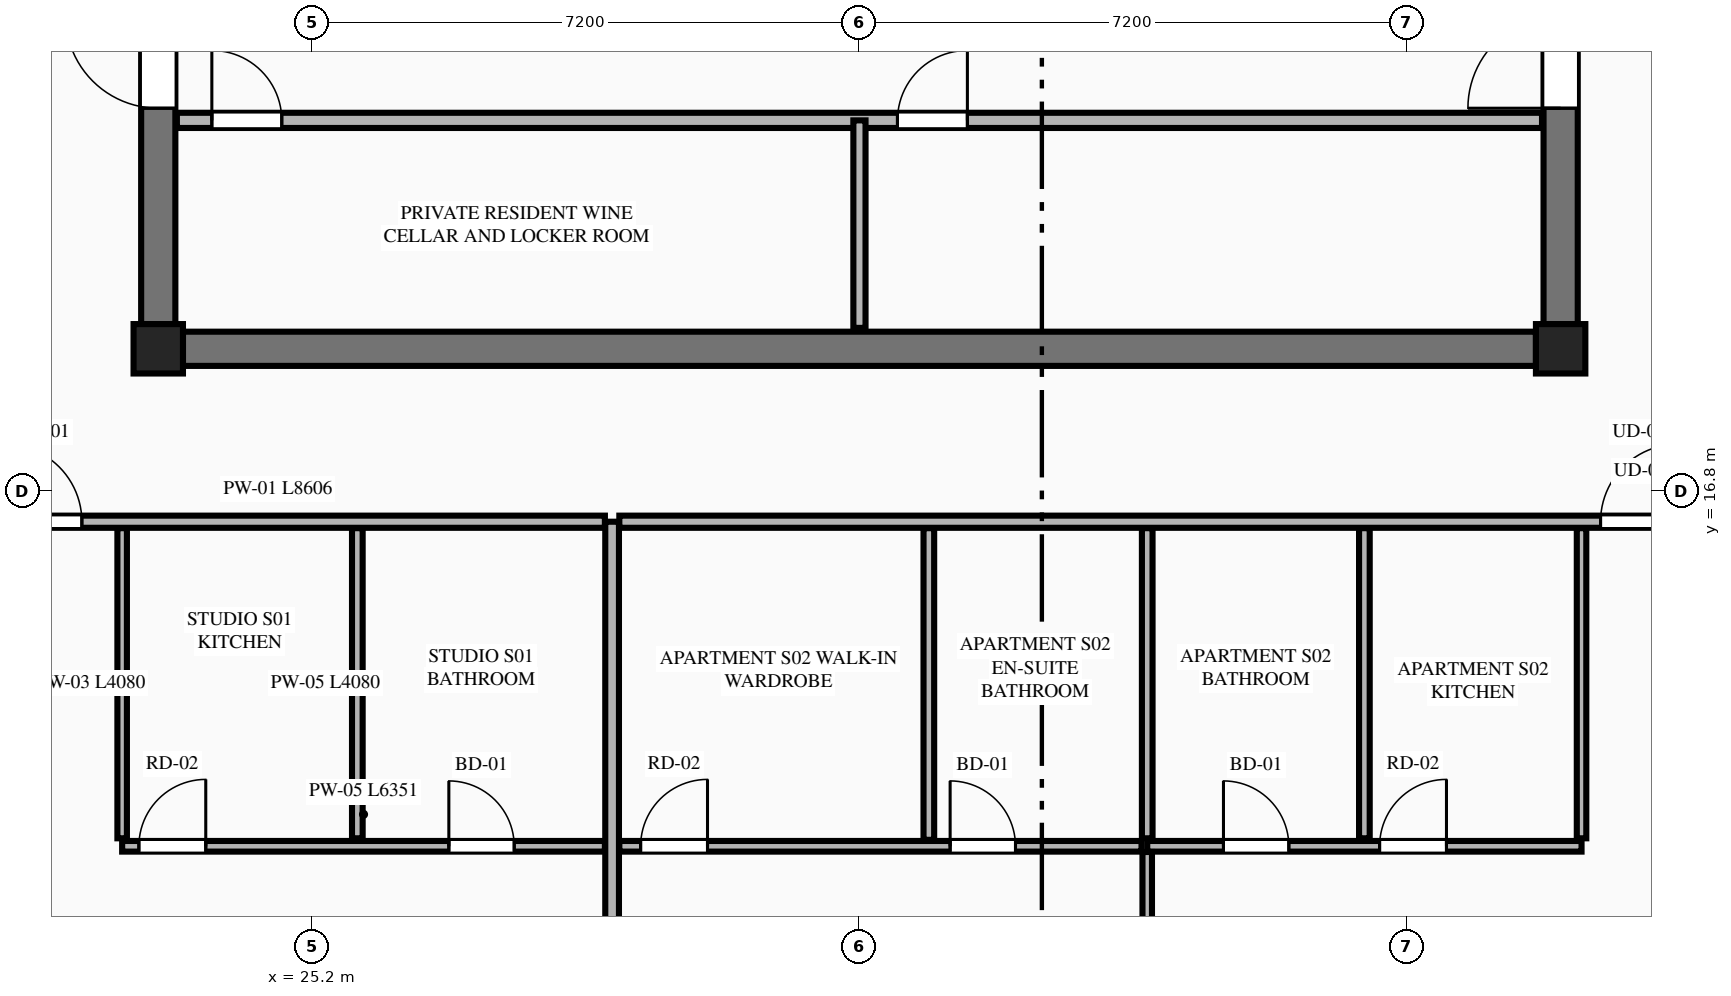
"""IFC4 building model, lengths in metres.
Left out: names, types, materials, properties, quantities, classifications, styles, units other than length and angle.
Written with IfcOpenShell. Run it as: python <this file> out.ifc"""

import sys

from ifc_helpers import new_model, si_unit, direction, frame, frame_2d, origin, origin_2d, place, context, subcontext, project, spatial, rectangle, extrude, element, fill, save


model = new_model("IFC4")
c1 = context("Model", 3, precision=1e-05, world=origin(), true_north=direction((0.0, 1.0)))
c2 = subcontext(c1, "Body", "Model", "MODEL_VIEW")
j1 = project(units=[si_unit("LENGTHUNIT", "METRE"), si_unit("PLANEANGLEUNIT", "RADIAN")], contexts=[c1])
p1 = place(None, origin())
s1 = spatial("IfcSite", under=j1, at=p1, CompositionType="ELEMENT")
p2 = place(p1, origin())
s2 = spatial("IfcBuilding", under=s1, at=p2, CompositionType="ELEMENT")
p3 = place(p2, frame((0.0, 0.0, 234.3)))
s3 = spatial("IfcBuildingStorey", under=s2, at=p3, CompositionType="ELEMENT", Elevation=234.3)
for number, where, z_axis, x_axis in (
    (1, (23.175, 18.675, 0.0), (0.0, 0.0, 1.0), (1.0, 0.0, 0.0)),
    (2, (41.625, 18.675, 0.0), (0.0, 0.0, 1.0), (1.0, 0.0, 0.0)),
):
    element("IfcColumn", number, at=place(p3, frame(where, z_axis=z_axis, x_axis=x_axis)), inside=s3, PredefinedType="COLUMN", context=c2, shape_type="SweptSolid", body=[
        extrude(rectangle(XDim=0.65, YDim=0.65, at=origin_2d()), origin(), (0.0, 0.0, 1.0), 3.65),
    ])
p4 = place(p3, frame((23.5, 18.675, 0.0), z_axis=(0.0, 0.0, 1.0), x_axis=(1.0, 0.0, 0.0)))
e3 = element("IfcWall", 3, at=p4, inside=s3, PredefinedType="SHEAR", context=c2, shape_type="SweptSolid", body=[
    extrude(rectangle(XDim=17.8, YDim=0.45, at=frame_2d((8.9, 0.0))), origin(), (0.0, 0.0, 1.0), 3.45),
])
p5 = place(p3, frame((23.175, 19.0, 0.0), z_axis=(0.0, 0.0, 1.0), x_axis=(0.0, 1.0, 0.0)))
e4 = element("IfcWall", 4, at=p5, inside=s3, PredefinedType="SHEAR", context=c2, shape_type="SweptSolid", body=[
    extrude(rectangle(XDim=13.8, YDim=0.45, at=frame_2d((6.9, 0.0))), origin(), (0.0, 0.0, 1.0), 3.45),
])
p6 = place(p5, frame((2.84, 0.0, 0.0)))
e5 = element("IfcOpeningElement", 5, at=p6, cuts=e4, PredefinedType="OPENING", context=c2, shape_type="SweptSolid", body=[
    extrude(rectangle(XDim=1.22, YDim=2.25, at=frame_2d((0.61, 1.125))), frame((0.0, 0.235, 0.0), z_axis=(0.0, -1.0, 0.0), x_axis=(1.0, 0.0, 0.0)), (0.0, 0.0, 1.0), 0.47),
])
p7 = place(p3, frame((41.625, 19.0, 0.0), z_axis=(0.0, 0.0, 1.0), x_axis=(0.0, 1.0, 0.0)))
e6 = element("IfcWall", 6, at=p7, inside=s3, PredefinedType="SHEAR", context=c2, shape_type="SweptSolid", body=[
    extrude(rectangle(XDim=13.8, YDim=0.45, at=frame_2d((6.9, 0.0))), origin(), (0.0, 0.0, 1.0), 3.45),
])
p8 = place(p7, frame((2.84, 0.0, 0.0)))
e7 = element("IfcOpeningElement", 7, at=p8, cuts=e6, PredefinedType="OPENING", context=c2, shape_type="SweptSolid", body=[
    extrude(rectangle(XDim=1.22, YDim=2.25, at=frame_2d((0.61, 1.125))), frame((0.0, 0.235, 0.0), z_axis=(0.0, -1.0, 0.0), x_axis=(1.0, 0.0, 0.0)), (0.0, 0.0, 1.0), 0.47),
])
p9 = place(p3, frame((23.42, 21.68, 0.0), z_axis=(0.0, 0.0, 1.0), x_axis=(1.0, 0.0, 0.0)))
e8 = element("IfcWall", 8, at=p9, inside=s3, PredefinedType="PLUMBINGWALL", context=c2, shape_type="SweptSolid", body=[
    extrude(rectangle(XDim=17.96, YDim=0.2, at=frame_2d((8.98, 0.0))), origin(), (0.0, 0.0, 1.0), 3.45),
])
p10 = place(p9, frame((0.46, 0.0, 0.0)))
e9 = element("IfcOpeningElement", 9, at=p10, cuts=e8, PredefinedType="OPENING", context=c2, shape_type="SweptSolid", body=[
    extrude(rectangle(XDim=0.92, YDim=2.15, at=frame_2d((0.46, 1.075))), frame((0.0, 0.11, 0.0), z_axis=(0.0, -1.0, 0.0), x_axis=(1.0, 0.0, 0.0)), (0.0, 0.0, 1.0), 0.22),
])
p11 = place(p9, frame((9.48, 0.0, 0.0)))
e10 = element("IfcOpeningElement", 10, at=p11, cuts=e8, PredefinedType="OPENING", context=c2, shape_type="SweptSolid", body=[
    extrude(rectangle(XDim=0.92, YDim=2.15, at=frame_2d((0.46, 1.075))), frame((0.0, 0.11, 0.0), z_axis=(0.0, -1.0, 0.0), x_axis=(1.0, 0.0, 0.0)), (0.0, 0.0, 1.0), 0.22),
])
p12 = place(p3, frame((32.4, 18.95, 0.0), z_axis=(0.0, 0.0, 1.0), x_axis=(0.0, 1.0, 0.0)))
e11 = element("IfcWall", 11, at=p12, inside=s3, PredefinedType="PARTITIONING", context=c2, shape_type="SweptSolid", body=[
    extrude(rectangle(XDim=2.73, YDim=0.16, at=frame_2d((1.365, 0.0))), origin(), (0.0, 0.0, 1.0), 3.45),
])
p13 = place(p3, frame((29.146, 7.405, 0.0), z_axis=(0.0, 0.0, 1.0), x_axis=(0.0, 1.0, 0.0)))
e12 = element("IfcWall", 12, at=p13, inside=s3, PredefinedType="PARTITIONING", context=c2, shape_type="SweptSolid", body=[
    extrude(rectangle(XDim=8.995, YDim=0.18, at=frame_2d((4.498, 0.0))), origin(), (0.0, 0.0, 1.0), 2.907),
])
p14 = place(p3, frame((20.445, 16.4, 0.0), z_axis=(0.0, 0.0, 1.0), x_axis=(1.0, 0.0, 0.0)))
e13 = element("IfcWall", 13, at=p14, inside=s3, PredefinedType="PARTITIONING", context=c2, shape_type="SweptSolid", body=[
    extrude(rectangle(XDim=8.606, YDim=0.16, at=frame_2d((4.303, 0.0))), origin(), (0.0, 0.0, 1.0), 3.45),
])
p15 = place(p14, frame((0.705, 0.0, 0.0)))
e14 = element("IfcOpeningElement", 14, at=p15, cuts=e13, PredefinedType="OPENING", context=c2, shape_type="SweptSolid", body=[
    extrude(rectangle(XDim=1.02, YDim=2.25, at=frame_2d((0.51, 1.125))), frame((0.0, 0.09, 0.0), z_axis=(0.0, -1.0, 0.0), x_axis=(1.0, 0.0, 0.0)), (0.0, 0.0, 1.0), 0.18),
])
p16 = place(p3, frame((22.7, 12.235, 0.0), z_axis=(0.0, 0.0, 1.0), x_axis=(0.0, 1.0, 0.0)))
e15 = element("IfcWall", 15, at=p16, inside=s3, PredefinedType="PARTITIONING", context=c2, shape_type="SweptSolid", body=[
    extrude(rectangle(XDim=4.08, YDim=0.125, at=frame_2d((2.04, 0.0))), origin(), (0.0, 0.0, 1.0), 2.907),
])
p17 = place(p3, frame((22.7, 12.13, 0.0), z_axis=(0.0, 0.0, 1.0), x_axis=(1.0, 0.0, 0.0)))
e16 = element("IfcWall", 16, at=p17, inside=s3, PredefinedType="PLUMBINGWALL", context=c2, shape_type="SweptSolid", body=[
    extrude(rectangle(XDim=6.351, YDim=0.14, at=frame_2d((3.176, 0.0))), origin(), (0.0, 0.0, 1.0), 3.45),
])
p18 = place(p17, frame((4.298, 0.0, 0.0)))
e17 = element("IfcOpeningElement", 17, at=p18, cuts=e16, PredefinedType="OPENING", context=c2, shape_type="SweptSolid", body=[
    extrude(rectangle(XDim=0.86, YDim=2.1, at=frame_2d((0.43, 1.05))), frame((0.0, 0.08, 0.0), z_axis=(0.0, -1.0, 0.0), x_axis=(1.0, 0.0, 0.0)), (0.0, 0.0, 1.0), 0.16),
])
p19 = place(p17, frame((0.22, 0.0, 0.0)))
e18 = element("IfcOpeningElement", 18, at=p19, cuts=e16, PredefinedType="OPENING", context=c2, shape_type="SweptSolid", body=[
    extrude(rectangle(XDim=0.88, YDim=2.15, at=frame_2d((0.44, 1.075))), frame((0.0, 0.08, 0.0), z_axis=(0.0, -1.0, 0.0), x_axis=(1.0, 0.0, 0.0)), (0.0, 0.0, 1.0), 0.16),
])
p20 = place(p3, frame((25.794, 12.235, 0.0), z_axis=(0.0, 0.0, 1.0), x_axis=(0.0, 1.0, 0.0)))
e19 = element("IfcWall", 19, at=p20, inside=s3, PredefinedType="PLUMBINGWALL", context=c2, shape_type="SweptSolid", body=[
    extrude(rectangle(XDim=4.08, YDim=0.14, at=frame_2d((2.04, 0.0))), origin(), (0.0, 0.0, 1.0), 3.45),
])
p21 = place(p3, frame((29.241, 16.4, 0.0), z_axis=(0.0, 0.0, 1.0), x_axis=(1.0, 0.0, 0.0)))
e20 = element("IfcWall", 20, at=p21, inside=s3, PredefinedType="PARTITIONING", context=c2, shape_type="SweptSolid", body=[
    extrude(rectangle(XDim=15.114, YDim=0.16, at=frame_2d((7.557, 0.0))), origin(), (0.0, 0.0, 1.0), 3.45),
])
p22 = place(p21, frame((12.909, 0.0, 0.0)))
e21 = element("IfcOpeningElement", 21, at=p22, cuts=e20, PredefinedType="OPENING", context=c2, shape_type="SweptSolid", body=[
    extrude(rectangle(XDim=1.02, YDim=2.25, at=frame_2d((0.51, 1.125))), frame((0.0, 0.09, 0.0), z_axis=(0.0, -1.0, 0.0), x_axis=(1.0, 0.0, 0.0)), (0.0, 0.0, 1.0), 0.18),
])
p23 = place(p3, frame((41.9, 12.235, 0.0), z_axis=(0.0, 0.0, 1.0), x_axis=(0.0, 1.0, 0.0)))
e22 = element("IfcWall", 22, at=p23, inside=s3, PredefinedType="PARTITIONING", context=c2, shape_type="SweptSolid", body=[
    extrude(rectangle(XDim=4.08, YDim=0.125, at=frame_2d((2.04, 0.0))), origin(), (0.0, 0.0, 1.0), 2.907),
])
p24 = place(p3, frame((36.186, 12.13, 0.0), z_axis=(0.0, 0.0, 1.0), x_axis=(1.0, 0.0, 0.0)))
e23 = element("IfcWall", 23, at=p24, inside=s3, PredefinedType="PLUMBINGWALL", context=c2, shape_type="SweptSolid", body=[
    extrude(rectangle(XDim=5.714, YDim=0.14, at=frame_2d((2.857, 0.0))), origin(), (0.0, 0.0, 1.0), 3.45),
])
p25 = place(p24, frame((1.003, 0.0, 0.0)))
e24 = element("IfcOpeningElement", 24, at=p25, cuts=e23, PredefinedType="OPENING", context=c2, shape_type="SweptSolid", body=[
    extrude(rectangle(XDim=0.86, YDim=2.1, at=frame_2d((0.43, 1.05))), frame((0.0, 0.08, 0.0), z_axis=(0.0, -1.0, 0.0), x_axis=(1.0, 0.0, 0.0)), (0.0, 0.0, 1.0), 0.16),
])
p26 = place(p24, frame((3.057, 0.0, 0.0)))
e25 = element("IfcOpeningElement", 25, at=p26, cuts=e23, PredefinedType="OPENING", context=c2, shape_type="SweptSolid", body=[
    extrude(rectangle(XDim=0.88, YDim=2.15, at=frame_2d((0.44, 1.075))), frame((0.0, 0.08, 0.0), z_axis=(0.0, -1.0, 0.0), x_axis=(1.0, 0.0, 0.0)), (0.0, 0.0, 1.0), 0.16),
])
p27 = place(p3, frame((29.241, 12.13, 0.0), z_axis=(0.0, 0.0, 1.0), x_axis=(1.0, 0.0, 0.0)))
e26 = element("IfcWall", 26, at=p27, inside=s3, PredefinedType="PLUMBINGWALL", context=c2, shape_type="SweptSolid", body=[
    extrude(rectangle(XDim=6.87, YDim=0.14, at=frame_2d((3.435, 0.0))), origin(), (0.0, 0.0, 1.0), 3.45),
])
p28 = place(p27, frame((0.28, 0.0, 0.0)))
e27 = element("IfcOpeningElement", 27, at=p28, cuts=e26, PredefinedType="OPENING", context=c2, shape_type="SweptSolid", body=[
    extrude(rectangle(XDim=0.88, YDim=2.15, at=frame_2d((0.44, 1.075))), frame((0.0, 0.08, 0.0), z_axis=(0.0, -1.0, 0.0), x_axis=(1.0, 0.0, 0.0)), (0.0, 0.0, 1.0), 0.16),
])
p29 = place(p27, frame((4.352, 0.0, 0.0)))
e28 = element("IfcOpeningElement", 28, at=p29, cuts=e26, PredefinedType="OPENING", context=c2, shape_type="SweptSolid", body=[
    extrude(rectangle(XDim=0.86, YDim=2.1, at=frame_2d((0.43, 1.05))), frame((0.0, 0.08, 0.0), z_axis=(0.0, -1.0, 0.0), x_axis=(1.0, 0.0, 0.0)), (0.0, 0.0, 1.0), 0.16),
])
for number, where, z_axis, x_axis in (
    (29, (39.043, 12.235, 0.0), (0.0, 0.0, 1.0), (0.0, 1.0, 0.0)),
    (30, (36.186, 12.235, 0.0), (0.0, 0.0, 1.0), (0.0, 1.0, 0.0)),
):
    element("IfcWall", number, at=place(p3, frame(where, z_axis=z_axis, x_axis=x_axis)), inside=s3, PredefinedType="PLUMBINGWALL", context=c2, shape_type="SweptSolid", body=[
        extrude(rectangle(XDim=4.08, YDim=0.14, at=frame_2d((2.04, 0.0))), origin(), (0.0, 0.0, 1.0), 3.45),
    ])
p30 = place(p3, frame((36.186, 7.315, 0.0), z_axis=(0.0, 0.0, 1.0), x_axis=(0.0, 1.0, 0.0)))
e31 = element("IfcWall", 31, at=p30, inside=s3, PredefinedType="PARTITIONING", context=c2, shape_type="SweptSolid", body=[
    extrude(rectangle(XDim=4.74, YDim=0.125, at=frame_2d((2.37, 0.0))), origin(), (0.0, 0.0, 1.0), 3.45),
])
p31 = place(p30, frame((1.05, 0.0, 0.0)))
e32 = element("IfcOpeningElement", 32, at=p31, cuts=e31, PredefinedType="OPENING", context=c2, shape_type="SweptSolid", body=[
    extrude(rectangle(XDim=0.92, YDim=2.15, at=frame_2d((0.46, 1.075))), frame((0.0, 0.073, 0.0), z_axis=(0.0, -1.0, 0.0), x_axis=(1.0, 0.0, 0.0)), (0.0, 0.0, 1.0), 0.145),
])
p32 = place(p3, frame((33.313, 12.215, 0.0), z_axis=(0.0, 0.0, 1.0), x_axis=(0.0, 1.0, 0.0)))
e33 = element("IfcWall", 33, at=p32, inside=s3, PredefinedType="PLUMBINGWALL", context=c2, shape_type="SweptSolid", body=[
    extrude(rectangle(XDim=4.1, YDim=0.14, at=frame_2d((2.05, 0.0))), origin(), (0.0, 0.0, 1.0), 3.45),
])
p33 = place(p6, origin())
e34 = element("IfcDoor", 34, at=p33, inside=s3, OperationType="SINGLE_SWING_RIGHT", PredefinedType="DOOR", context=c2, shape_type="SweptSolid", body=[
    extrude(rectangle(XDim=1.22, YDim=2.25, at=frame_2d((0.61, 1.125))), frame((0.0, 0.025, 0.0), z_axis=(0.0, -1.0, 0.0), x_axis=(1.0, 0.0, 0.0)), (0.0, 0.0, 1.0), 0.05),
])
fill(e5, e34)
p34 = place(p8, origin())
e35 = element("IfcDoor", 35, at=p34, inside=s3, OperationType="SINGLE_SWING_LEFT", PredefinedType="DOOR", context=c2, shape_type="SweptSolid", body=[
    extrude(rectangle(XDim=1.22, YDim=2.25, at=frame_2d((0.61, 1.125))), frame((0.0, 0.025, 0.0), z_axis=(0.0, -1.0, 0.0), x_axis=(1.0, 0.0, 0.0)), (0.0, 0.0, 1.0), 0.05),
])
fill(e7, e35)
p35 = place(p10, origin())
e36 = element("IfcDoor", 36, at=p35, inside=s3, OperationType="SINGLE_SWING_LEFT", PredefinedType="DOOR", context=c2, shape_type="SweptSolid", body=[
    extrude(rectangle(XDim=0.92, YDim=2.15, at=frame_2d((0.46, 1.075))), frame((0.0, 0.025, 0.0), z_axis=(0.0, -1.0, 0.0), x_axis=(1.0, 0.0, 0.0)), (0.0, 0.0, 1.0), 0.05),
])
fill(e9, e36)
p36 = place(p11, origin())
e37 = element("IfcDoor", 37, at=p36, inside=s3, OperationType="SINGLE_SWING_RIGHT", PredefinedType="DOOR", context=c2, shape_type="SweptSolid", body=[
    extrude(rectangle(XDim=0.92, YDim=2.15, at=frame_2d((0.46, 1.075))), frame((0.0, 0.025, 0.0), z_axis=(0.0, -1.0, 0.0), x_axis=(1.0, 0.0, 0.0)), (0.0, 0.0, 1.0), 0.05),
])
fill(e10, e37)
p37 = place(p18, origin())
e38 = element("IfcDoor", 38, at=p37, inside=s3, OperationType="SINGLE_SWING_LEFT", PredefinedType="DOOR", context=c2, shape_type="SweptSolid", body=[
    extrude(rectangle(XDim=0.86, YDim=2.1, at=frame_2d((0.43, 1.05))), frame((0.0, 0.025, 0.0), z_axis=(0.0, -1.0, 0.0), x_axis=(1.0, 0.0, 0.0)), (0.0, 0.0, 1.0), 0.05),
])
fill(e17, e38)
p38 = place(p15, origin())
e39 = element("IfcDoor", 39, at=p38, inside=s3, OperationType="SINGLE_SWING_LEFT", PredefinedType="DOOR", context=c2, shape_type="SweptSolid", body=[
    extrude(rectangle(XDim=1.02, YDim=2.25, at=frame_2d((0.51, 1.125))), frame((0.0, 0.025, 0.0), z_axis=(0.0, -1.0, 0.0), x_axis=(1.0, 0.0, 0.0)), (0.0, 0.0, 1.0), 0.05),
])
fill(e14, e39)
p39 = place(p19, origin())
e40 = element("IfcDoor", 40, at=p39, inside=s3, OperationType="SINGLE_SWING_RIGHT", PredefinedType="DOOR", context=c2, shape_type="SweptSolid", body=[
    extrude(rectangle(XDim=0.88, YDim=2.15, at=frame_2d((0.44, 1.075))), frame((0.0, 0.025, 0.0), z_axis=(0.0, -1.0, 0.0), x_axis=(1.0, 0.0, 0.0)), (0.0, 0.0, 1.0), 0.05),
])
fill(e18, e40)
p40 = place(p25, origin())
e41 = element("IfcDoor", 41, at=p40, inside=s3, OperationType="SINGLE_SWING_LEFT", PredefinedType="DOOR", context=c2, shape_type="SweptSolid", body=[
    extrude(rectangle(XDim=0.86, YDim=2.1, at=frame_2d((0.43, 1.05))), frame((0.0, 0.025, 0.0), z_axis=(0.0, -1.0, 0.0), x_axis=(1.0, 0.0, 0.0)), (0.0, 0.0, 1.0), 0.05),
])
fill(e24, e41)
p41 = place(p28, origin())
e42 = element("IfcDoor", 42, at=p41, inside=s3, OperationType="SINGLE_SWING_RIGHT", PredefinedType="DOOR", context=c2, shape_type="SweptSolid", body=[
    extrude(rectangle(XDim=0.88, YDim=2.15, at=frame_2d((0.44, 1.075))), frame((0.0, 0.025, 0.0), z_axis=(0.0, -1.0, 0.0), x_axis=(1.0, 0.0, 0.0)), (0.0, 0.0, 1.0), 0.05),
])
fill(e27, e42)
p42 = place(p29, origin())
e43 = element("IfcDoor", 43, at=p42, inside=s3, OperationType="SINGLE_SWING_LEFT", PredefinedType="DOOR", context=c2, shape_type="SweptSolid", body=[
    extrude(rectangle(XDim=0.86, YDim=2.1, at=frame_2d((0.43, 1.05))), frame((0.0, 0.025, 0.0), z_axis=(0.0, -1.0, 0.0), x_axis=(1.0, 0.0, 0.0)), (0.0, 0.0, 1.0), 0.05),
])
fill(e28, e43)
p43 = place(p22, origin())
e44 = element("IfcDoor", 44, at=p43, inside=s3, OperationType="SINGLE_SWING_RIGHT", PredefinedType="DOOR", context=c2, shape_type="SweptSolid", body=[
    extrude(rectangle(XDim=1.02, YDim=2.25, at=frame_2d((0.51, 1.125))), frame((0.0, 0.025, 0.0), z_axis=(0.0, -1.0, 0.0), x_axis=(1.0, 0.0, 0.0)), (0.0, 0.0, 1.0), 0.05),
])
fill(e21, e44)
p44 = place(p26, origin())
e45 = element("IfcDoor", 45, at=p44, inside=s3, OperationType="SINGLE_SWING_RIGHT", PredefinedType="DOOR", context=c2, shape_type="SweptSolid", body=[
    extrude(rectangle(XDim=0.88, YDim=2.15, at=frame_2d((0.44, 1.075))), frame((0.0, 0.025, 0.0), z_axis=(0.0, -1.0, 0.0), x_axis=(1.0, 0.0, 0.0)), (0.0, 0.0, 1.0), 0.05),
])
fill(e25, e45)
save(model, sys.argv[1])
